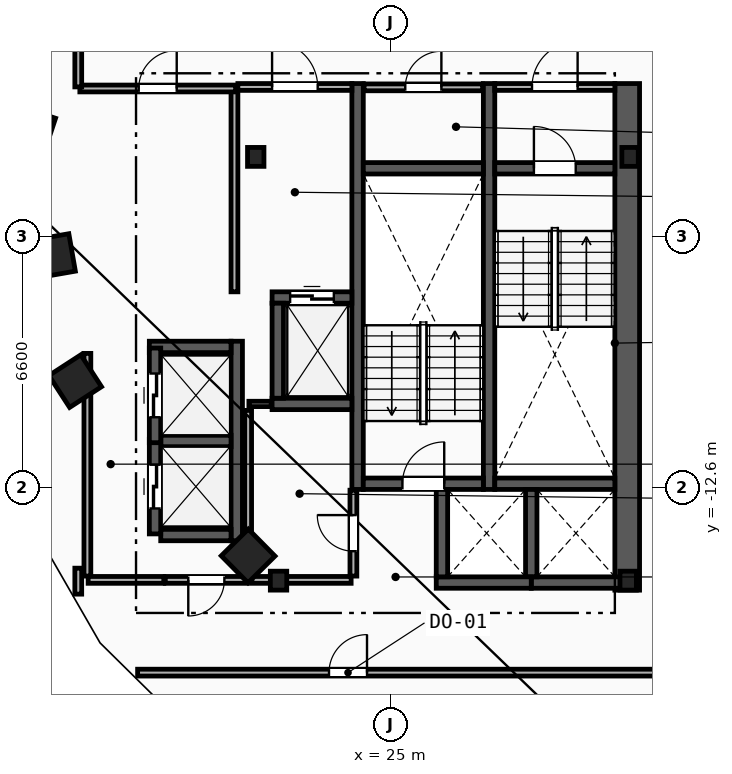
"""IFC4 building model, lengths in metres.
Left out: names, types, materials, properties, quantities, classifications, styles, units other than length and angle.
Written with IfcOpenShell. Run it as: python <this file> out.ifc"""

import sys

from ifc_helpers import new_model, si_unit, direction, frame, frame_2d, origin, origin_2d, place, context, subcontext, project, spatial, rectangle, i_section, extrude, element, fill, save


model = new_model("IFC4")
c1 = context("Model", 3, precision=1e-05, world=origin(), true_north=direction((0.0, 1.0)))
c2 = subcontext(c1, "Body", "Model", "MODEL_VIEW")
j1 = project(units=[si_unit("LENGTHUNIT", "METRE"), si_unit("PLANEANGLEUNIT", "RADIAN")], contexts=[c1])
p1 = place(None, origin())
s1 = spatial("IfcSite", under=j1, at=p1, CompositionType="ELEMENT")
p2 = place(p1, origin())
s2 = spatial("IfcBuilding", under=s1, at=p2, CompositionType="ELEMENT")
p3 = place(p2, frame((0.0, 0.0, 140.4)))
s3 = spatial("IfcBuildingStorey", under=s2, at=p3, CompositionType="ELEMENT", Elevation=140.4)
for number, where, z_axis, x_axis in (
    (1, (31.3, -3.9, 0.0), (0.0, 0.0, 1.0), (1.0, 0.0, 0.0)),
    (2, (21.45, -3.9, 0.0), (0.0, 0.0, 1.0), (1.0, 0.0, 0.0)),
    (3, (22.05, -15.05, 0.0), (0.0, 0.0, 1.0), (1.0, 0.0, 0.0)),
    (4, (31.25, -15.05, 0.0), (0.0, 0.0, 1.0), (1.0, 0.0, 0.0)),
):
    element("IfcColumn", number, at=place(p3, frame(where, z_axis=z_axis, x_axis=x_axis)), inside=s3, PredefinedType="COLUMN", context=c2, shape_type="SweptSolid", body=[
        extrude(i_section(OverallWidth=0.432, OverallDepth=0.498, WebThickness=0.056, FlangeThickness=0.089, FilletRadius=0.018, at=origin_2d()), origin(), (0.0, 0.0, 1.0), 3.6),
    ])
for number, where, z_axis, x_axis in (
    (5, (15.55, -3.2, 0.0), (0.0, 0.0, 1.0), (-0.315, -0.949, 0.0)),
    (6, (16.125, -6.5, 0.0), (0.0, 0.0, 1.0), (0.172, -0.985, 0.0)),
    (7, (16.7, -9.8, 0.0), (0.0, 0.0, 1.0), (0.544, -0.839, 0.0)),
    (8, (21.25, -14.4, 0.0), (0.0, 0.0, 1.0), (0.703, -0.711, 0.0)),
):
    element("IfcColumn", number, at=place(p3, frame(where, z_axis=z_axis, x_axis=x_axis)), inside=s3, PredefinedType="COLUMN", context=c2, shape_type="SweptSolid", body=[
        extrude(rectangle(XDim=1.0, YDim=1.0, at=origin_2d()), origin(), (0.0, 0.0, 1.0), 3.6),
    ])
p4 = place(p3, frame((31.225, -15.3, 0.0), z_axis=(0.0, 0.0, 1.0), x_axis=(0.0, 1.0, 0.0)))
e9 = element("IfcWall", 9, at=p4, inside=s3, PredefinedType="SHEAR", context=c2, shape_type="SweptSolid", body=[
    extrude(rectangle(XDim=13.33, YDim=0.65, at=frame_2d((6.665, 0.0))), origin(), (0.0, 0.0, 1.0), 3.36),
])
for number, where, z_axis, x_axis in (
    (10, (27.59, -12.65, 0.0), (0.0, 0.0, 1.0), (0.0, 1.0, 0.0)),
    (11, (24.13, -12.65, 0.0), (0.0, 0.0, 1.0), (0.0, 1.0, 0.0)),
):
    element("IfcWall", number, at=place(p3, frame(where, z_axis=z_axis, x_axis=x_axis)), inside=s3, PredefinedType="SHEAR", context=c2, shape_type="SweptSolid", body=[
        extrude(rectangle(XDim=10.68, YDim=0.3, at=frame_2d((5.34, 0.0))), origin(), (0.0, 0.0, 1.0), 3.36),
    ])
p5 = place(p3, frame((27.74, -4.2, 0.0), z_axis=(0.0, 0.0, 1.0), x_axis=(1.0, 0.0, 0.0)))
e12 = element("IfcWall", 12, at=p5, inside=s3, PredefinedType="SHEAR", context=c2, shape_type="SweptSolid", body=[
    extrude(rectangle(XDim=3.16, YDim=0.3, at=frame_2d((1.58, 0.0))), origin(), (0.0, 0.0, 1.0), 3.36),
])
p6 = place(p5, frame((1.03, 0.0, 0.0)))
e13 = element("IfcOpeningElement", 13, at=p6, cuts=e12, PredefinedType="OPENING", context=c2, shape_type="SweptSolid", body=[
    extrude(rectangle(XDim=1.1, YDim=2.15, at=frame_2d((0.55, 1.075))), frame((0.0, 0.16, 0.0), z_axis=(0.0, -1.0, 0.0), x_axis=(1.0, 0.0, 0.0)), (0.0, 0.0, 1.0), 0.32),
])
p7 = place(p3, frame((27.74, -12.5, 0.0), z_axis=(0.0, 0.0, 1.0), x_axis=(1.0, 0.0, 0.0)))
e14 = element("IfcWall", 14, at=p7, inside=s3, PredefinedType="SHEAR", context=c2, shape_type="SweptSolid", body=[
    extrude(rectangle(XDim=3.16, YDim=0.3, at=frame_2d((1.58, 0.0))), origin(), (0.0, 0.0, 1.0), 3.36),
])
p8 = place(p3, frame((24.28, -12.5, 0.0), z_axis=(0.0, 0.0, 1.0), x_axis=(1.0, 0.0, 0.0)))
e15 = element("IfcWall", 15, at=p8, inside=s3, PredefinedType="SHEAR", context=c2, shape_type="SweptSolid", body=[
    extrude(rectangle(XDim=3.16, YDim=0.3, at=frame_2d((1.58, 0.0))), origin(), (0.0, 0.0, 1.0), 3.36),
])
p9 = place(p8, frame((1.03, 0.0, 0.0)))
e16 = element("IfcOpeningElement", 16, at=p9, cuts=e15, PredefinedType="OPENING", context=c2, shape_type="SweptSolid", body=[
    extrude(rectangle(XDim=1.1, YDim=2.15, at=frame_2d((0.55, 1.075))), frame((0.0, 0.16, 0.0), z_axis=(0.0, -1.0, 0.0), x_axis=(1.0, 0.0, 0.0)), (0.0, 0.0, 1.0), 0.32),
])
p10 = place(p3, frame((24.28, -4.2, 0.0), z_axis=(0.0, 0.0, 1.0), x_axis=(1.0, 0.0, 0.0)))
e17 = element("IfcWall", 17, at=p10, inside=s3, PredefinedType="SHEAR", context=c2, shape_type="SweptSolid", body=[
    extrude(rectangle(XDim=3.16, YDim=0.3, at=frame_2d((1.58, 0.0))), origin(), (0.0, 0.0, 1.0), 3.36),
])
p11 = place(p3, frame((20.89, -7.45, 0.0), z_axis=(0.0, 0.0, 1.0), x_axis=(0.0, 1.0, 0.0)))
e18 = element("IfcWall", 18, at=p11, inside=s3, PredefinedType="PARTITIONING", context=c2, shape_type="SweptSolid", body=[
    extrude(rectangle(XDim=5.3, YDim=0.18, at=frame_2d((2.65, 0.0))), origin(), (0.0, 0.0, 1.0), 3.36),
])
p12 = place(p3, frame((20.98, -2.06, 0.0), z_axis=(0.0, 0.0, 1.0), x_axis=(1.0, 0.0, 0.0)))
e19 = element("IfcWall", 19, at=p12, inside=s3, PredefinedType="PARTITIONING", context=c2, shape_type="SweptSolid", body=[
    extrude(rectangle(XDim=3.0, YDim=0.18, at=frame_2d((1.5, 0.0))), origin(), (0.0, 0.0, 1.0), 3.36),
])
p13 = place(p12, frame((0.9, 0.0, 0.0)))
e20 = element("IfcOpeningElement", 20, at=p13, cuts=e19, PredefinedType="OPENING", context=c2, shape_type="SweptSolid", body=[
    extrude(rectangle(XDim=1.2, YDim=2.15, at=frame_2d((0.6, 1.075))), frame((0.0, 0.1, 0.0), z_axis=(0.0, -1.0, 0.0), x_axis=(1.0, 0.0, 0.0)), (0.0, 0.0, 1.0), 0.2),
])
p14 = place(p3, frame((27.74, -2.06, 0.0), z_axis=(0.0, 0.0, 1.0), x_axis=(1.0, 0.0, 0.0)))
e21 = element("IfcWall", 21, at=p14, inside=s3, PredefinedType="PARTITIONING", context=c2, shape_type="SweptSolid", body=[
    extrude(rectangle(XDim=3.16, YDim=0.18, at=frame_2d((1.58, 0.0))), origin(), (0.0, 0.0, 1.0), 3.36),
])
p15 = place(p14, frame((0.98, 0.0, 0.0)))
e22 = element("IfcOpeningElement", 22, at=p15, cuts=e21, PredefinedType="OPENING", context=c2, shape_type="SweptSolid", body=[
    extrude(rectangle(XDim=1.2, YDim=2.15, at=frame_2d((0.6, 1.075))), frame((0.0, 0.1, 0.0), z_axis=(0.0, -1.0, 0.0), x_axis=(1.0, 0.0, 0.0)), (0.0, 0.0, 1.0), 0.2),
])
p16 = place(p3, frame((21.88, -7.6, 0.0), z_axis=(0.0, 0.0, 1.0), x_axis=(1.0, 0.0, 0.0)))
e23 = element("IfcWall", 23, at=p16, inside=s3, PredefinedType="SHEAR", context=c2, shape_type="SweptSolid", body=[
    extrude(rectangle(XDim=2.1, YDim=0.3, at=frame_2d((1.05, 0.0))), origin(), (0.0, 0.0, 1.0), 3.36),
])
p17 = place(p16, frame((0.475, 0.0, 0.0)))
e24 = element("IfcOpeningElement", 24, at=p17, cuts=e23, PredefinedType="OPENING", context=c2, shape_type="SweptSolid", body=[
    extrude(rectangle(XDim=1.15, YDim=2.2, at=frame_2d((0.575, 1.1))), frame((0.0, 0.16, 0.0), z_axis=(0.0, -1.0, 0.0), x_axis=(1.0, 0.0, 0.0)), (0.0, 0.0, 1.0), 0.32),
])
p18 = place(p3, frame((21.88, -10.4, 0.0), z_axis=(0.0, 0.0, 1.0), x_axis=(1.0, 0.0, 0.0)))
e25 = element("IfcWall", 25, at=p18, inside=s3, PredefinedType="SHEAR", context=c2, shape_type="SweptSolid", body=[
    extrude(rectangle(XDim=2.1, YDim=0.3, at=frame_2d((1.05, 0.0))), origin(), (0.0, 0.0, 1.0), 3.36),
])
for number, where, z_axis, x_axis in (
    (26, (22.03, -10.25, 0.0), (0.0, 0.0, 1.0), (0.0, 1.0, 0.0)),
    (27, (28.7, -15.1, 0.0), (0.0, 0.0, 1.0), (1.0, 0.0, 0.0)),
):
    element("IfcWall", number, at=place(p3, frame(where, z_axis=z_axis, x_axis=x_axis)), inside=s3, PredefinedType="SHEAR", context=c2, shape_type="SweptSolid", body=[
        extrude(rectangle(XDim=2.5, YDim=0.3, at=frame_2d((1.25, 0.0))), origin(), (0.0, 0.0, 1.0), 3.36),
    ])
p19 = place(p3, frame((28.7, -14.95, 0.0), z_axis=(0.0, 0.0, 1.0), x_axis=(0.0, 1.0, 0.0)))
e28 = element("IfcWall", 28, at=p19, inside=s3, PredefinedType="SHEAR", context=c2, shape_type="SweptSolid", body=[
    extrude(rectangle(XDim=2.3, YDim=0.3, at=frame_2d((1.15, 0.0))), origin(), (0.0, 0.0, 1.0), 3.36),
])
p20 = place(p3, frame((26.2, -15.1, 0.0), z_axis=(0.0, 0.0, 1.0), x_axis=(1.0, 0.0, 0.0)))
e29 = element("IfcWall", 29, at=p20, inside=s3, PredefinedType="SHEAR", context=c2, shape_type="SweptSolid", body=[
    extrude(rectangle(XDim=2.5, YDim=0.3, at=frame_2d((1.25, 0.0))), origin(), (0.0, 0.0, 1.0), 3.36),
])
p21 = place(p3, frame((26.35, -14.95, 0.0), z_axis=(0.0, 0.0, 1.0), x_axis=(0.0, 1.0, 0.0)))
e30 = element("IfcWall", 30, at=p21, inside=s3, PredefinedType="SHEAR", context=c2, shape_type="SweptSolid", body=[
    extrude(rectangle(XDim=2.3, YDim=0.3, at=frame_2d((1.15, 0.0))), origin(), (0.0, 0.0, 1.0), 3.36),
])
p22 = place(p3, frame((20.95, -14.0, 0.0), z_axis=(0.0, 0.0, 1.0), x_axis=(0.0, 1.0, 0.0)))
e31 = element("IfcWall", 31, at=p22, inside=s3, PredefinedType="SHEAR", context=c2, shape_type="SweptSolid", body=[
    extrude(rectangle(XDim=5.25, YDim=0.3, at=frame_2d((2.625, 0.0))), origin(), (0.0, 0.0, 1.0), 3.36),
])
p23 = place(p3, frame((18.95, -13.85, 0.0), z_axis=(0.0, 0.0, 1.0), x_axis=(1.0, 0.0, 0.0)))
e32 = element("IfcWall", 32, at=p23, inside=s3, PredefinedType="SHEAR", context=c2, shape_type="SweptSolid", body=[
    extrude(rectangle(XDim=1.85, YDim=0.3, at=frame_2d((0.925, 0.0))), origin(), (0.0, 0.0, 1.0), 3.36),
])
p24 = place(p3, frame((18.65, -8.9, 0.0), z_axis=(0.0, 0.0, 1.0), x_axis=(1.0, 0.0, 0.0)))
e33 = element("IfcWall", 33, at=p24, inside=s3, PredefinedType="SHEAR", context=c2, shape_type="SweptSolid", body=[
    extrude(rectangle(XDim=2.15, YDim=0.3, at=frame_2d((1.075, 0.0))), origin(), (0.0, 0.0, 1.0), 3.36),
])
p25 = place(p3, frame((18.95, -11.375, 0.0), z_axis=(0.0, 0.0, 1.0), x_axis=(1.0, 0.0, 0.0)))
e34 = element("IfcWall", 34, at=p25, inside=s3, PredefinedType="SHEAR", context=c2, shape_type="SweptSolid", body=[
    extrude(rectangle(XDim=1.85, YDim=0.3, at=frame_2d((0.925, 0.0))), origin(), (0.0, 0.0, 1.0), 3.36),
])
p26 = place(p3, frame((18.8, -13.82, 0.0), z_axis=(0.0, 0.0, 1.0), x_axis=(0.0, 1.0, 0.0)))
e35 = element("IfcWall", 35, at=p26, inside=s3, PredefinedType="SHEAR", context=c2, shape_type="SweptSolid", body=[
    extrude(rectangle(XDim=2.49, YDim=0.3, at=frame_2d((1.245, 0.0))), origin(), (0.0, 0.0, 1.0), 3.36),
])
p27 = place(p26, frame((0.67, 0.0, 0.0)))
e36 = element("IfcOpeningElement", 36, at=p27, cuts=e35, PredefinedType="OPENING", context=c2, shape_type="SweptSolid", body=[
    extrude(rectangle(XDim=1.15, YDim=2.2, at=frame_2d((0.575, 1.1))), frame((0.0, 0.16, 0.0), z_axis=(0.0, -1.0, 0.0), x_axis=(1.0, 0.0, 0.0)), (0.0, 0.0, 1.0), 0.32),
])
p28 = place(p3, frame((18.8, -11.42, 0.0), z_axis=(0.0, 0.0, 1.0), x_axis=(0.0, 1.0, 0.0)))
e37 = element("IfcWall", 37, at=p28, inside=s3, PredefinedType="SHEAR", context=c2, shape_type="SweptSolid", body=[
    extrude(rectangle(XDim=2.49, YDim=0.3, at=frame_2d((1.245, 0.0))), origin(), (0.0, 0.0, 1.0), 3.36),
])
p29 = place(p28, frame((0.67, 0.0, 0.0)))
e38 = element("IfcOpeningElement", 38, at=p29, cuts=e37, PredefinedType="OPENING", context=c2, shape_type="SweptSolid", body=[
    extrude(rectangle(XDim=1.15, YDim=2.2, at=frame_2d((0.575, 1.1))), frame((0.0, 0.16, 0.0), z_axis=(0.0, -1.0, 0.0), x_axis=(1.0, 0.0, 0.0)), (0.0, 0.0, 1.0), 0.32),
])
p30 = place(p3, frame((17.02, -14.93, 0.0), z_axis=(0.0, 0.0, 1.0), x_axis=(0.0, 1.0, 0.0)))
e39 = element("IfcWall", 39, at=p30, inside=s3, PredefinedType="PARTITIONING", context=c2, shape_type="SweptSolid", body=[
    extrude(rectangle(XDim=5.86, YDim=0.18, at=frame_2d((2.93, 0.0))), origin(), (0.0, 0.0, 1.0), 3.36),
])
p31 = place(p3, frame((17.04, -15.03, 0.0), z_axis=(0.0, 0.0, 1.0), x_axis=(1.0, 0.0, 0.0)))
e40 = element("IfcWall", 40, at=p31, inside=s3, PredefinedType="PARTITIONING", context=c2, shape_type="SweptSolid", body=[
    extrude(rectangle(XDim=1.99, YDim=0.18, at=frame_2d((0.995, 0.0))), origin(), (0.0, 0.0, 1.0), 3.36),
])
p32 = place(p3, frame((21.23, -15.03, 0.0), z_axis=(0.0, 0.0, 1.0), x_axis=(-1.0, 0.0, 0.0)))
e41 = element("IfcWall", 41, at=p32, inside=s3, PredefinedType="PARTITIONING", context=c2, shape_type="SweptSolid", body=[
    extrude(rectangle(XDim=2.16, YDim=0.18, at=frame_2d((1.08, 0.0))), origin(), (0.0, 0.0, 1.0), 3.36),
])
p33 = place(p32, frame((0.605, 0.0, 0.0)))
e42 = element("IfcOpeningElement", 42, at=p33, cuts=e41, PredefinedType="OPENING", context=c2, shape_type="SweptSolid", body=[
    extrude(rectangle(XDim=0.95, YDim=2.1, at=frame_2d((0.475, 1.05))), frame((0.0, 0.1, 0.0), z_axis=(0.0, -1.0, 0.0), x_axis=(1.0, 0.0, 0.0)), (0.0, 0.0, 1.0), 0.2),
])
p34 = place(p3, frame((21.27, -10.4, 0.0), z_axis=(0.0, 0.0, 1.0), x_axis=(1.0, 0.0, 0.0)))
e43 = element("IfcWall", 43, at=p34, inside=s3, PredefinedType="PARTITIONING", context=c2, shape_type="SweptSolid", body=[
    extrude(rectangle(XDim=0.59, YDim=0.14, at=frame_2d((0.295, 0.0))), origin(), (0.0, 0.0, 1.0), 3.36),
])
p35 = place(p3, frame((21.25, -14.93, 0.0), z_axis=(0.0, 0.0, 1.0), x_axis=(0.0, 1.0, 0.0)))
e44 = element("IfcWall", 44, at=p35, inside=s3, PredefinedType="PARTITIONING", context=c2, shape_type="SweptSolid", body=[
    extrude(rectangle(XDim=4.36, YDim=0.18, at=frame_2d((2.18, 0.0))), origin(), (0.0, 0.0, 1.0), 3.36),
])
p36 = place(p3, frame((21.35, -15.03, 0.0), z_axis=(0.0, 0.0, 1.0), x_axis=(1.0, 0.0, 0.0)))
e45 = element("IfcWall", 45, at=p36, inside=s3, PredefinedType="PARTITIONING", context=c2, shape_type="SweptSolid", body=[
    extrude(rectangle(XDim=2.61, YDim=0.18, at=frame_2d((1.305, 0.0))), origin(), (0.0, 0.0, 1.0), 2.433),
])
p37 = place(p3, frame((24.3, -2.07, 0.0), z_axis=(0.0, 0.0, 1.0), x_axis=(1.0, 0.0, 0.0)))
e46 = element("IfcWall", 46, at=p37, inside=s3, PredefinedType="PARTITIONING", context=c2, shape_type="SweptSolid", body=[
    extrude(rectangle(XDim=3.12, YDim=0.18, at=frame_2d((1.56, 0.0))), origin(), (0.0, 0.0, 1.0), 3.36),
])
p38 = place(p37, frame((1.085, 0.0, 0.0)))
e47 = element("IfcOpeningElement", 47, at=p38, cuts=e46, PredefinedType="OPENING", context=c2, shape_type="SweptSolid", body=[
    extrude(rectangle(XDim=0.95, YDim=2.1, at=frame_2d((0.475, 1.05))), frame((0.0, 0.1, 0.0), z_axis=(0.0, -1.0, 0.0), x_axis=(1.0, 0.0, 0.0)), (0.0, 0.0, 1.0), 0.2),
])
p39 = place(p3, frame((24.02, -14.93, 0.0), z_axis=(0.0, 0.0, 1.0), x_axis=(0.0, 1.0, 0.0)))
e48 = element("IfcWall", 48, at=p39, inside=s3, PredefinedType="PARTITIONING", context=c2, shape_type="SweptSolid", body=[
    extrude(rectangle(XDim=2.26, YDim=0.18, at=frame_2d((1.13, 0.0))), origin(), (0.0, 0.0, 1.0), 3.36),
])
p40 = place(p39, frame((0.655, 0.0, 0.0)))
e49 = element("IfcOpeningElement", 49, at=p40, cuts=e48, PredefinedType="OPENING", context=c2, shape_type="SweptSolid", body=[
    extrude(rectangle(XDim=0.95, YDim=2.1, at=frame_2d((0.475, 1.05))), frame((0.0, 0.1, 0.0), z_axis=(0.0, -1.0, 0.0), x_axis=(1.0, 0.0, 0.0)), (0.0, 0.0, 1.0), 0.2),
])
p41 = place(p3, frame((18.342, -17.47, 0.0), z_axis=(0.0, 0.0, 1.0), x_axis=(1.0, 0.0, 0.0)))
e50 = element("IfcWall", 50, at=p41, inside=s3, PredefinedType="PARTITIONING", context=c2, shape_type="SweptSolid", body=[
    extrude(rectangle(XDim=15.287, YDim=0.18, at=frame_2d((7.643, 0.0))), origin(), (0.0, 0.0, 1.0), 3.36),
])
p42 = place(p41, frame((5.036, 0.0, 0.0)))
e51 = element("IfcOpeningElement", 51, at=p42, cuts=e50, PredefinedType="OPENING", context=c2, shape_type="SweptSolid", body=[
    extrude(rectangle(XDim=1.0, YDim=2.15, at=frame_2d((0.5, 1.075))), frame((0.0, 0.1, 0.0), z_axis=(0.0, -1.0, 0.0), x_axis=(1.0, 0.0, 0.0)), (0.0, 0.0, 1.0), 0.2),
])
p43 = place(p3, frame((16.822, -2.1, 0.0), z_axis=(0.0, 0.0, 1.0), x_axis=(1.0, 0.0, 0.0)))
e52 = element("IfcWall", 52, at=p43, inside=s3, PredefinedType="PARTITIONING", context=c2, shape_type="SweptSolid", body=[
    extrude(rectangle(XDim=4.098, YDim=0.18, at=frame_2d((2.049, 0.0))), origin(), (0.0, 0.0, 1.0), 3.36),
])
p44 = place(p43, frame((1.549, 0.0, 0.0)))
e53 = element("IfcOpeningElement", 53, at=p44, cuts=e52, PredefinedType="OPENING", context=c2, shape_type="SweptSolid", body=[
    extrude(rectangle(XDim=1.0, YDim=2.15, at=frame_2d((0.5, 1.075))), frame((0.0, 0.1, 0.0), z_axis=(0.0, -1.0, 0.0), x_axis=(1.0, 0.0, 0.0)), (0.0, 0.0, 1.0), 0.2),
])
p45 = place(p3, frame((16.78, 0.329, 0.0), z_axis=(0.0, 0.0, 1.0), x_axis=(0.0, -1.0, 0.0)))
e54 = element("IfcWall", 54, at=p45, inside=s3, PredefinedType="PARTITIONING", context=c2, shape_type="SweptSolid", body=[
    extrude(rectangle(XDim=2.387, YDim=0.18, at=frame_2d((1.194, 0.0))), origin(), (0.0, 0.0, 1.0), 3.36),
])
p46 = place(p3, frame((16.78, -14.721, 0.0), z_axis=(0.0, 0.0, 1.0), x_axis=(0.0, -1.0, 0.0)))
e55 = element("IfcWall", 55, at=p46, inside=s3, PredefinedType="PARTITIONING", context=c2, shape_type="SweptSolid", body=[
    extrude(rectangle(XDim=0.684, YDim=0.18, at=frame_2d((0.342, 0.0))), origin(), (0.0, 0.0, 1.0), 3.36),
])
p47 = place(p6, origin())
e56 = element("IfcDoor", 56, at=p47, inside=s3, OperationType="SINGLE_SWING_LEFT", PredefinedType="DOOR", context=c2, shape_type="SweptSolid", body=[
    extrude(rectangle(XDim=1.1, YDim=2.15, at=frame_2d((0.55, 1.075))), frame((0.0, 0.025, 0.0), z_axis=(0.0, -1.0, 0.0), x_axis=(1.0, 0.0, 0.0)), (0.0, 0.0, 1.0), 0.05),
])
fill(e13, e56)
p48 = place(p9, origin())
e57 = element("IfcDoor", 57, at=p48, inside=s3, OperationType="SINGLE_SWING_RIGHT", PredefinedType="DOOR", context=c2, shape_type="SweptSolid", body=[
    extrude(rectangle(XDim=1.1, YDim=2.15, at=frame_2d((0.55, 1.075))), frame((0.0, 0.025, 0.0), z_axis=(0.0, -1.0, 0.0), x_axis=(1.0, 0.0, 0.0)), (0.0, 0.0, 1.0), 0.05),
])
fill(e16, e57)
p49 = place(p13, origin())
e58 = element("IfcDoor", 58, at=p49, inside=s3, OperationType="SINGLE_SWING_LEFT", PredefinedType="DOOR", context=c2, shape_type="SweptSolid", body=[
    extrude(rectangle(XDim=1.2, YDim=2.15, at=frame_2d((0.6, 1.075))), frame((0.0, 0.025, 0.0), z_axis=(0.0, -1.0, 0.0), x_axis=(1.0, 0.0, 0.0)), (0.0, 0.0, 1.0), 0.05),
])
fill(e20, e58)
p50 = place(p15, origin())
e59 = element("IfcDoor", 59, at=p50, inside=s3, OperationType="SINGLE_SWING_RIGHT", PredefinedType="DOOR", context=c2, shape_type="SweptSolid", body=[
    extrude(rectangle(XDim=1.2, YDim=2.15, at=frame_2d((0.6, 1.075))), frame((0.0, 0.025, 0.0), z_axis=(0.0, -1.0, 0.0), x_axis=(1.0, 0.0, 0.0)), (0.0, 0.0, 1.0), 0.05),
])
fill(e22, e59)
p51 = place(p17, origin())
e60 = element("IfcDoor", 60, at=p51, inside=s3, OperationType="SLIDING_TO_LEFT", PredefinedType="TRAPDOOR", context=c2, shape_type="SweptSolid", body=[
    extrude(rectangle(XDim=1.15, YDim=2.2, at=frame_2d((0.575, 1.1))), frame((0.0, 0.025, 0.0), z_axis=(0.0, -1.0, 0.0), x_axis=(1.0, 0.0, 0.0)), (0.0, 0.0, 1.0), 0.05),
])
fill(e24, e60)
p52 = place(p27, origin())
e61 = element("IfcDoor", 61, at=p52, inside=s3, OperationType="SLIDING_TO_LEFT", PredefinedType="TRAPDOOR", context=c2, shape_type="SweptSolid", body=[
    extrude(rectangle(XDim=1.15, YDim=2.2, at=frame_2d((0.575, 1.1))), frame((0.0, 0.025, 0.0), z_axis=(0.0, -1.0, 0.0), x_axis=(1.0, 0.0, 0.0)), (0.0, 0.0, 1.0), 0.05),
])
fill(e36, e61)
p53 = place(p29, origin())
e62 = element("IfcDoor", 62, at=p53, inside=s3, OperationType="SLIDING_TO_LEFT", PredefinedType="TRAPDOOR", context=c2, shape_type="SweptSolid", body=[
    extrude(rectangle(XDim=1.15, YDim=2.2, at=frame_2d((0.575, 1.1))), frame((0.0, 0.025, 0.0), z_axis=(0.0, -1.0, 0.0), x_axis=(1.0, 0.0, 0.0)), (0.0, 0.0, 1.0), 0.05),
])
fill(e38, e62)
p54 = place(p42, origin())
e63 = element("IfcDoor", 63, at=p54, inside=s3, OperationType="SINGLE_SWING_RIGHT", PredefinedType="DOOR", context=c2, shape_type="SweptSolid", body=[
    extrude(rectangle(XDim=1.0, YDim=2.15, at=frame_2d((0.5, 1.075))), frame((0.0, 0.025, 0.0), z_axis=(0.0, -1.0, 0.0), x_axis=(1.0, 0.0, 0.0)), (0.0, 0.0, 1.0), 0.05),
])
fill(e51, e63)
p55 = place(p44, origin())
e64 = element("IfcDoor", 64, at=p55, inside=s3, OperationType="SINGLE_SWING_RIGHT", PredefinedType="DOOR", context=c2, shape_type="SweptSolid", body=[
    extrude(rectangle(XDim=1.0, YDim=2.15, at=frame_2d((0.5, 1.075))), frame((0.0, 0.025, 0.0), z_axis=(0.0, -1.0, 0.0), x_axis=(1.0, 0.0, 0.0)), (0.0, 0.0, 1.0), 0.05),
])
fill(e53, e64)
p56 = place(p38, origin())
e65 = element("IfcDoor", 65, at=p56, inside=s3, OperationType="SINGLE_SWING_RIGHT", PredefinedType="DOOR", context=c2, shape_type="SweptSolid", body=[
    extrude(rectangle(XDim=0.95, YDim=2.1, at=frame_2d((0.475, 1.05))), frame((0.0, 0.025, 0.0), z_axis=(0.0, -1.0, 0.0), x_axis=(1.0, 0.0, 0.0)), (0.0, 0.0, 1.0), 0.05),
])
fill(e47, e65)
p57 = place(p40, origin())
e66 = element("IfcDoor", 66, at=p57, inside=s3, OperationType="SINGLE_SWING_RIGHT", PredefinedType="DOOR", context=c2, shape_type="SweptSolid", body=[
    extrude(rectangle(XDim=0.95, YDim=2.1, at=frame_2d((0.475, 1.05))), frame((0.0, 0.025, 0.0), z_axis=(0.0, -1.0, 0.0), x_axis=(1.0, 0.0, 0.0)), (0.0, 0.0, 1.0), 0.05),
])
fill(e49, e66)
p58 = place(p33, origin())
e67 = element("IfcDoor", 67, at=p58, inside=s3, OperationType="SINGLE_SWING_RIGHT", PredefinedType="DOOR", context=c2, shape_type="SweptSolid", body=[
    extrude(rectangle(XDim=0.95, YDim=2.1, at=frame_2d((0.475, 1.05))), frame((0.0, 0.025, 0.0), z_axis=(0.0, -1.0, 0.0), x_axis=(1.0, 0.0, 0.0)), (0.0, 0.0, 1.0), 0.05),
])
fill(e42, e67)
save(model, sys.argv[1])
